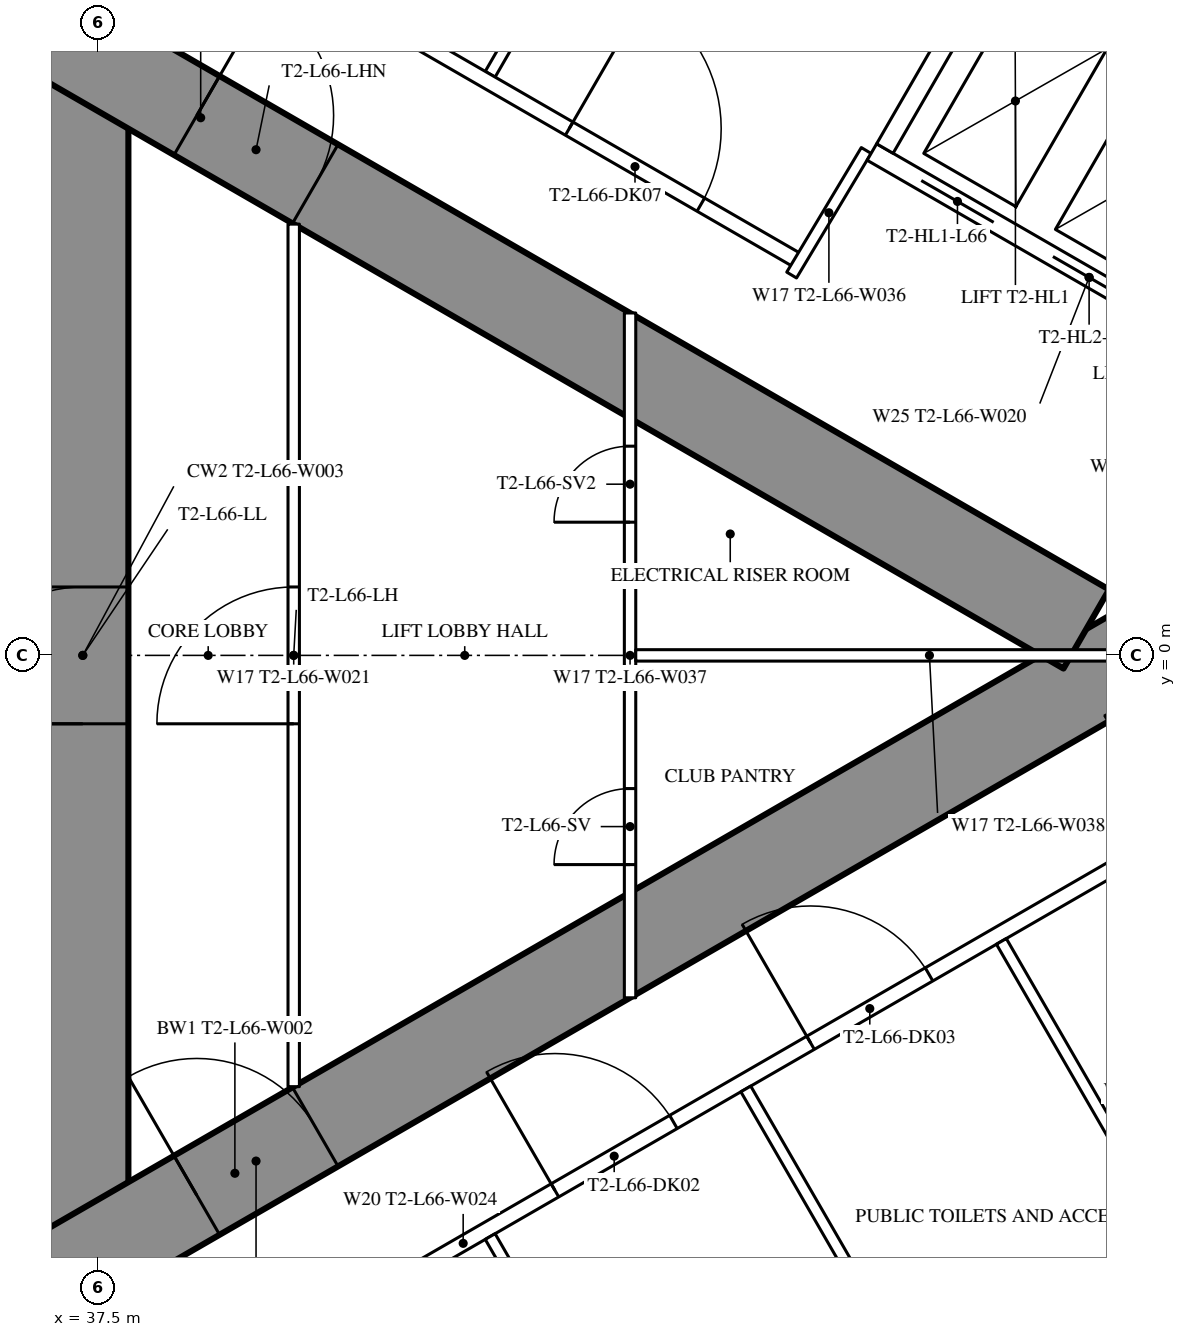
"""IFC4 building model, lengths in metres.
Left out: names, types, materials, properties, quantities, classifications, styles, units other than length and angle.
Written with IfcOpenShell. Run it as: python <this file> out.ifc"""

import sys

from ifc_helpers import new_model, si_unit, direction, frame, frame_2d, origin, place, context, subcontext, project, spatial, rectangle, extrude, element, fill, save


model = new_model("IFC4")
c1 = context("Model", 3, precision=1e-05, world=origin(), true_north=direction((0.0, 1.0)))
c2 = subcontext(c1, "Body", "Model", "MODEL_VIEW")
j1 = project(units=[si_unit("LENGTHUNIT", "METRE"), si_unit("PLANEANGLEUNIT", "RADIAN")], contexts=[c1])
p1 = place(None, origin())
s1 = spatial("IfcSite", under=j1, at=p1, CompositionType="ELEMENT")
p2 = place(p1, origin())
s2 = spatial("IfcBuilding", under=s1, at=p2, CompositionType="ELEMENT")
p3 = place(p2, frame((0.0, 0.0, 247.7)))
s3 = spatial("IfcBuildingStorey", under=s2, at=p3, CompositionType="ELEMENT", Elevation=247.7)
p4 = place(p3, frame((37.3, -8.6, 0.0), z_axis=(0.0, 0.0, 1.0), x_axis=(0.0, 1.0, 0.0)))
e1 = element("IfcWall", 1, at=p4, inside=s3, PredefinedType="SHEAR", context=c2, shape_type="SweptSolid", body=[
    extrude(rectangle(XDim=17.2, YDim=1.2, at=frame_2d((8.6, 0.0))), origin(), (0.0, 0.0, 1.0), 4.2),
])
p5 = place(p4, frame((7.7, 0.0, 0.0)))
e2 = element("IfcOpeningElement", 2, at=p5, cuts=e1, PredefinedType="OPENING", context=c2, shape_type="SweptSolid", body=[
    extrude(rectangle(XDim=1.8, YDim=2.2, at=frame_2d((0.9, 1.1))), frame((0.0, 0.61, 0.0), z_axis=(0.0, -1.0, 0.0), x_axis=(1.0, 0.0, 0.0)), (0.0, 0.0, 1.0), 1.22),
])
p6 = place(p3, frame((27.2, -13.8, 0.0), z_axis=(0.0, 0.0, 1.0), x_axis=(0.866027159892, 0.499996958321, 0.0)))
e3 = element("IfcWall", 3, at=p6, inside=s3, PredefinedType="SHEAR", context=c2, shape_type="SweptSolid", body=[
    extrude(rectangle(XDim=27.947, YDim=1.2, at=frame_2d((13.973, 0.0))), origin(), (0.0, 0.0, 1.0), 4.2),
])
p7 = place(p6, frame((4.6, 0.0, 0.0)))
e4 = element("IfcOpeningElement", 4, at=p7, cuts=e3, PredefinedType="OPENING", context=c2, shape_type="SweptSolid", body=[
    extrude(rectangle(XDim=1.0, YDim=2.2, at=frame_2d((0.5, 1.1))), frame((0.0, 0.61, 0.0), z_axis=(0.0, -1.0, 0.0), x_axis=(1.0, 0.0, 0.0)), (0.0, 0.0, 1.0), 1.22),
])
p8 = place(p6, frame((13.395, 0.0, 0.0)))
e5 = element("IfcOpeningElement", 5, at=p8, cuts=e3, PredefinedType="OPENING", context=c2, shape_type="SweptSolid", body=[
    extrude(rectangle(XDim=1.8, YDim=2.2, at=frame_2d((0.9, 1.1))), frame((0.0, 0.61, 0.0), z_axis=(0.0, -1.0, 0.0), x_axis=(1.0, 0.0, 0.0)), (0.0, 0.0, 1.0), 1.22),
])
p9 = place(p3, frame((27.2, 13.8, 0.0), z_axis=(0.0, 0.0, 1.0), x_axis=(0.866024515034, -0.500001539357, 0.0)))
e6 = element("IfcWall", 6, at=p9, inside=s3, PredefinedType="SHEAR", context=c2, shape_type="SweptSolid", body=[
    extrude(rectangle(XDim=26.907, YDim=1.2, at=frame_2d((13.454, 0.0))), origin(), (0.0, 0.0, 1.0), 4.2),
])
p10 = place(p9, frame((4.6, 0.0, 0.0)))
e7 = element("IfcOpeningElement", 7, at=p10, cuts=e6, PredefinedType="OPENING", context=c2, shape_type="SweptSolid", body=[
    extrude(rectangle(XDim=1.0, YDim=2.2, at=frame_2d((0.5, 1.1))), frame((0.0, 0.61, 0.0), z_axis=(0.0, -1.0, 0.0), x_axis=(1.0, 0.0, 0.0)), (0.0, 0.0, 1.0), 1.22),
])
p11 = place(p9, frame((13.395, 0.0, 0.0)))
e8 = element("IfcOpeningElement", 8, at=p11, cuts=e6, PredefinedType="OPENING", context=c2, shape_type="SweptSolid", body=[
    extrude(rectangle(XDim=1.8, YDim=2.2, at=frame_2d((0.9, 1.1))), frame((0.0, 0.61, 0.0), z_axis=(0.0, -1.0, 0.0), x_axis=(1.0, 0.0, 0.0)), (0.0, 0.0, 1.0), 1.22),
])
p12 = place(p3, frame((28.907, -15.47, 0.0), z_axis=(0.0, 0.0, 1.0), x_axis=(0.866023700353, 0.500002950419, 0.0)))
e9 = element("IfcWall", 9, at=p12, inside=s3, PredefinedType="PARTITIONING", context=c2, shape_type="SweptSolid", body=[
    extrude(rectangle(XDim=30.941, YDim=0.2, at=frame_2d((15.47, 0.0))), origin(), (0.0, 0.0, 1.0), 3.95),
])
p13 = place(p12, frame((7.124, 0.0, 0.0)))
e10 = element("IfcOpeningElement", 10, at=p13, cuts=e9, PredefinedType="OPENING", context=c2, shape_type="SweptSolid", body=[
    extrude(rectangle(XDim=1.8, YDim=2.2, at=frame_2d((0.9, 1.1))), frame((0.0, 0.11, 0.0), z_axis=(0.0, -1.0, 0.0), x_axis=(1.0, 0.0, 0.0)), (0.0, 0.0, 1.0), 0.22),
])
p14 = place(p12, frame((16.865, 0.0, 0.0)))
e11 = element("IfcOpeningElement", 11, at=p14, cuts=e9, PredefinedType="OPENING", context=c2, shape_type="SweptSolid", body=[
    extrude(rectangle(XDim=1.8, YDim=2.2, at=frame_2d((0.9, 1.1))), frame((0.0, 0.11, 0.0), z_axis=(0.0, -1.0, 0.0), x_axis=(1.0, 0.0, 0.0)), (0.0, 0.0, 1.0), 0.22),
])
p15 = place(p12, frame((20.748, 0.0, 0.0)))
e12 = element("IfcOpeningElement", 12, at=p15, cuts=e9, PredefinedType="OPENING", context=c2, shape_type="SweptSolid", body=[
    extrude(rectangle(XDim=1.8, YDim=2.2, at=frame_2d((0.9, 1.1))), frame((0.0, 0.11, 0.0), z_axis=(0.0, -1.0, 0.0), x_axis=(1.0, 0.0, 0.0)), (0.0, 0.0, 1.0), 0.22),
])
p16 = place(p12, frame((26.252, 0.0, 0.0)))
e13 = element("IfcOpeningElement", 13, at=p16, cuts=e9, PredefinedType="OPENING", context=c2, shape_type="SweptSolid", body=[
    extrude(rectangle(XDim=1.8, YDim=2.2, at=frame_2d((0.9, 1.1))), frame((0.0, 0.11, 0.0), z_axis=(0.0, -1.0, 0.0), x_axis=(1.0, 0.0, 0.0)), (0.0, 0.0, 1.0), 0.22),
])
p17 = place(p3, frame((42.66, -7.646, 0.0), z_axis=(0.0, 0.0, 1.0), x_axis=(0.499996592859, -0.866027370889, 0.0)))
e14 = element("IfcWall", 14, at=p17, inside=s3, PredefinedType="PARTITIONING", context=c2, shape_type="SweptSolid", body=[
    extrude(rectangle(XDim=6.398, YDim=0.15, at=frame_2d((3.199, 0.0))), origin(), (0.0, 0.0, 1.0), 3.05),
])
p18 = place(p3, frame((46.023, -5.704, 0.0), z_axis=(0.0, 0.0, 1.0), x_axis=(0.499984478165, -0.866034365135, 0.0)))
e15 = element("IfcWall", 15, at=p18, inside=s3, PredefinedType="PARTITIONING", context=c2, shape_type="SweptSolid", body=[
    extrude(rectangle(XDim=6.426, YDim=0.15, at=frame_2d((3.213, 0.0))), origin(), (0.0, 0.0, 1.0), 3.05),
])
p19 = place(p3, frame((49.385, -3.763, 0.0), z_axis=(0.0, 0.0, 1.0), x_axis=(0.499999447814, -0.866025722589, 0.0)))
e16 = element("IfcWall", 16, at=p19, inside=s3, PredefinedType="PARTITIONING", context=c2, shape_type="SweptSolid", body=[
    extrude(rectangle(XDim=6.333, YDim=0.15, at=frame_2d((3.166, 0.0))), origin(), (0.0, 0.0, 1.0), 3.05),
])
p20 = place(p3, frame((42.66, 7.646, 0.0), z_axis=(0.0, 0.0, 1.0), x_axis=(0.499996592859, 0.866027370889, 0.0)))
e17 = element("IfcWall", 17, at=p20, inside=s3, PredefinedType="PARTITIONING", context=c2, shape_type="SweptSolid", body=[
    extrude(rectangle(XDim=6.398, YDim=0.15, at=frame_2d((3.199, 0.0))), origin(), (0.0, 0.0, 1.0), 3.05),
])
p21 = place(p3, frame((28.907, 15.47, 0.0), z_axis=(0.0, 0.0, 1.0), x_axis=(0.866026627509, -0.499997880441, 0.0)))
e18 = element("IfcWall", 18, at=p21, inside=s3, PredefinedType="PARTITIONING", context=c2, shape_type="SweptSolid", body=[
    extrude(rectangle(XDim=20.563, YDim=0.2, at=frame_2d((10.282, 0.0))), origin(), (0.0, 0.0, 1.0), 3.95),
])
p22 = place(p21, frame((17.081, 0.0, 0.0)))
e19 = element("IfcOpeningElement", 19, at=p22, cuts=e18, PredefinedType="OPENING", context=c2, shape_type="SweptSolid", body=[
    extrude(rectangle(XDim=2.0, YDim=2.4, at=frame_2d((1.0, 1.2))), frame((0.0, 0.11, 0.0), z_axis=(0.0, -1.0, 0.0), x_axis=(1.0, 0.0, 0.0)), (0.0, 0.0, 1.0), 0.22),
])
p23 = place(p21, frame((7.124, 0.0, 0.0)))
e20 = element("IfcOpeningElement", 20, at=p23, cuts=e18, PredefinedType="OPENING", context=c2, shape_type="SweptSolid", body=[
    extrude(rectangle(XDim=1.8, YDim=2.2, at=frame_2d((0.9, 1.1))), frame((0.0, 0.11, 0.0), z_axis=(0.0, -1.0, 0.0), x_axis=(1.0, 0.0, 0.0)), (0.0, 0.0, 1.0), 0.22),
])
p24 = place(p3, frame((47.606, 6.642, 0.0), z_axis=(0.0, 0.0, 1.0), x_axis=(-0.51353662755, -0.858067673418, 0.0)))
e21 = element("IfcWall", 21, at=p24, inside=s3, PredefinedType="PARTITIONING", context=c2, shape_type="SweptSolid", body=[
    extrude(rectangle(XDim=1.91, YDim=0.15, at=frame_2d((0.955, 0.0))), origin(), (0.0, 0.0, 1.0), 3.95),
])
p25 = place(p3, frame((40.075, -5.674, 0.0), z_axis=(0.0, 0.0, 1.0), x_axis=(0.0, 1.0, 0.0)))
e22 = element("IfcWall", 22, at=p25, inside=s3, PredefinedType="PARTITIONING", context=c2, shape_type="SweptSolid", body=[
    extrude(rectangle(XDim=11.348, YDim=0.15, at=frame_2d((5.674, 0.0))), origin(), (0.0, 0.0, 1.0), 3.95),
])
p26 = place(p25, frame((4.774, 0.0, 0.0)))
e23 = element("IfcOpeningElement", 23, at=p26, cuts=e22, PredefinedType="OPENING", context=c2, shape_type="SweptSolid", body=[
    extrude(rectangle(XDim=1.8, YDim=2.2, at=frame_2d((0.9, 1.1))), frame((0.0, 0.085, 0.0), z_axis=(0.0, -1.0, 0.0), x_axis=(1.0, 0.0, 0.0)), (0.0, 0.0, 1.0), 0.17),
])
p27 = place(p3, frame((44.5, -4.505, 0.0), z_axis=(0.0, 0.0, 1.0), x_axis=(0.0, 1.0, 0.0)))
e24 = element("IfcWall", 24, at=p27, inside=s3, PredefinedType="PARTITIONING", context=c2, shape_type="SweptSolid", body=[
    extrude(rectangle(XDim=9.009, YDim=0.15, at=frame_2d((4.505, 0.0))), origin(), (0.0, 0.0, 1.0), 3.95),
])
p28 = place(p27, frame((1.752, 0.0, 0.0)))
e25 = element("IfcOpeningElement", 25, at=p28, cuts=e24, PredefinedType="OPENING", context=c2, shape_type="SweptSolid", body=[
    extrude(rectangle(XDim=1.0, YDim=2.2, at=frame_2d((0.5, 1.1))), frame((0.0, 0.085, 0.0), z_axis=(0.0, -1.0, 0.0), x_axis=(1.0, 0.0, 0.0)), (0.0, 0.0, 1.0), 0.17),
])
p29 = place(p27, frame((6.257, 0.0, 0.0)))
e26 = element("IfcOpeningElement", 26, at=p29, cuts=e24, PredefinedType="OPENING", context=c2, shape_type="SweptSolid", body=[
    extrude(rectangle(XDim=1.0, YDim=2.2, at=frame_2d((0.5, 1.1))), frame((0.0, 0.085, 0.0), z_axis=(0.0, -1.0, 0.0), x_axis=(1.0, 0.0, 0.0)), (0.0, 0.0, 1.0), 0.17),
])
p30 = place(p3, frame((44.575, 0.0, 0.0), z_axis=(0.0, 0.0, 1.0), x_axis=(1.0, 0.0, 0.0)))
e27 = element("IfcWall", 27, at=p30, inside=s3, PredefinedType="PARTITIONING", context=c2, shape_type="SweptSolid", body=[
    extrude(rectangle(XDim=7.727, YDim=0.15, at=frame_2d((3.864, 0.0))), origin(), (0.0, 0.0, 1.0), 3.05),
])
p31 = place(p3, frame((47.681, 6.622, 0.0), z_axis=(0.0, 0.0, 1.0), x_axis=(0.86603344179, -0.499986077507, 0.0)))
e28 = element("IfcWall", 28, at=p31, inside=s3, PredefinedType="PARTITIONING", context=c2, shape_type="SweptSolid", body=[
    extrude(rectangle(XDim=6.6, YDim=0.25, at=frame_2d((3.3, 0.0))), origin(), (0.0, 0.0, 1.0), 3.95),
])
p32 = place(p31, frame((0.75, 0.0, 0.0)))
e29 = element("IfcOpeningElement", 29, at=p32, cuts=e28, PredefinedType="OPENING", context=c2, shape_type="SweptSolid", body=[
    extrude(rectangle(XDim=1.1, YDim=2.2, at=frame_2d((0.55, 1.1))), frame((0.0, 0.135, 0.0), z_axis=(0.0, -1.0, 0.0), x_axis=(1.0, 0.0, 0.0)), (0.0, 0.0, 1.0), 0.27),
])
p33 = place(p31, frame((2.75, 0.0, 0.0)))
e30 = element("IfcOpeningElement", 30, at=p33, cuts=e28, PredefinedType="OPENING", context=c2, shape_type="SweptSolid", body=[
    extrude(rectangle(XDim=1.1, YDim=2.2, at=frame_2d((0.55, 1.1))), frame((0.0, 0.135, 0.0), z_axis=(0.0, -1.0, 0.0), x_axis=(1.0, 0.0, 0.0)), (0.0, 0.0, 1.0), 0.27),
])
p34 = place(p31, frame((4.75, 0.0, 0.0)))
e31 = element("IfcOpeningElement", 31, at=p34, cuts=e28, PredefinedType="OPENING", context=c2, shape_type="SweptSolid", body=[
    extrude(rectangle(XDim=1.1, YDim=2.2, at=frame_2d((0.55, 1.1))), frame((0.0, 0.135, 0.0), z_axis=(0.0, -1.0, 0.0), x_axis=(1.0, 0.0, 0.0)), (0.0, 0.0, 1.0), 0.27),
])
p35 = place(p3, frame((49.406, 9.611, 0.0), z_axis=(0.0, 0.0, 1.0), x_axis=(0.86603344179, -0.499986077507, 0.0)))
e32 = element("IfcWall", 32, at=p35, inside=s3, PredefinedType="PARTITIONING", context=c2, shape_type="SweptSolid", body=[
    extrude(rectangle(XDim=6.6, YDim=0.25, at=frame_2d((3.3, 0.0))), origin(), (0.0, 0.0, 1.0), 3.95),
])
p36 = place(p3, frame((47.852, 6.668, 0.0), z_axis=(0.0, 0.0, 1.0), x_axis=(0.499929347863, 0.866066190972, 0.0)))
e33 = element("IfcWall", 33, at=p36, inside=s3, PredefinedType="PARTITIONING", context=c2, shape_type="SweptSolid", body=[
    extrude(rectangle(XDim=3.201, YDim=0.25, at=frame_2d((1.6, 0.0))), origin(), (0.0, 0.0, 1.0), 3.95),
])
p37 = place(p14, origin())
e34 = element("IfcDoor", 34, at=p37, inside=s3, OperationType="DOUBLE_DOOR_SINGLE_SWING", PredefinedType="DOOR", context=c2, shape_type="SweptSolid", body=[
    extrude(rectangle(XDim=1.8, YDim=2.2, at=frame_2d((0.9, 1.1))), frame((0.0, 0.025, 0.0), z_axis=(0.0, -1.0, 0.0), x_axis=(1.0, 0.0, 0.0)), (0.0, 0.0, 1.0), 0.05),
])
fill(e11, e34)
p38 = place(p15, origin())
e35 = element("IfcDoor", 35, at=p38, inside=s3, OperationType="DOUBLE_DOOR_SINGLE_SWING", PredefinedType="DOOR", context=c2, shape_type="SweptSolid", body=[
    extrude(rectangle(XDim=1.8, YDim=2.2, at=frame_2d((0.9, 1.1))), frame((0.0, 0.025, 0.0), z_axis=(0.0, -1.0, 0.0), x_axis=(1.0, 0.0, 0.0)), (0.0, 0.0, 1.0), 0.05),
])
fill(e12, e35)
p39 = place(p22, origin())
e36 = element("IfcDoor", 36, at=p39, inside=s3, OperationType="DOUBLE_DOOR_SINGLE_SWING", PredefinedType="DOOR", context=c2, shape_type="SweptSolid", body=[
    extrude(rectangle(XDim=2.0, YDim=2.4, at=frame_2d((1.0, 1.2))), frame((0.0, 0.025, 0.0), z_axis=(0.0, -1.0, 0.0), x_axis=(1.0, 0.0, 0.0)), (0.0, 0.0, 1.0), 0.05),
])
fill(e19, e36)
p40 = place(p26, origin())
e37 = element("IfcDoor", 37, at=p40, inside=s3, OperationType="DOUBLE_DOOR_SINGLE_SWING", PredefinedType="DOOR", context=c2, shape_type="SweptSolid", body=[
    extrude(rectangle(XDim=1.8, YDim=2.2, at=frame_2d((0.9, 1.1))), frame((0.0, 0.025, 0.0), z_axis=(0.0, -1.0, 0.0), x_axis=(1.0, 0.0, 0.0)), (0.0, 0.0, 1.0), 0.05),
])
fill(e23, e37)
p41 = place(p28, origin())
e38 = element("IfcDoor", 38, at=p41, inside=s3, OperationType="SINGLE_SWING_LEFT", PredefinedType="DOOR", context=c2, shape_type="SweptSolid", body=[
    extrude(rectangle(XDim=1.0, YDim=2.2, at=frame_2d((0.5, 1.1))), frame((0.0, 0.025, 0.0), z_axis=(0.0, -1.0, 0.0), x_axis=(1.0, 0.0, 0.0)), (0.0, 0.0, 1.0), 0.05),
])
fill(e25, e38)
p42 = place(p29, origin())
e39 = element("IfcDoor", 39, at=p42, inside=s3, OperationType="SINGLE_SWING_LEFT", PredefinedType="DOOR", context=c2, shape_type="SweptSolid", body=[
    extrude(rectangle(XDim=1.0, YDim=2.2, at=frame_2d((0.5, 1.1))), frame((0.0, 0.025, 0.0), z_axis=(0.0, -1.0, 0.0), x_axis=(1.0, 0.0, 0.0)), (0.0, 0.0, 1.0), 0.05),
])
fill(e26, e39)
p43 = place(p8, origin())
e40 = element("IfcDoor", 40, at=p43, inside=s3, OperationType="DOUBLE_DOOR_SINGLE_SWING", PredefinedType="DOOR", context=c2, shape_type="SweptSolid", body=[
    extrude(rectangle(XDim=1.8, YDim=2.2, at=frame_2d((0.9, 1.1))), frame((0.0, 0.025, 0.0), z_axis=(0.0, -1.0, 0.0), x_axis=(1.0, 0.0, 0.0)), (0.0, 0.0, 1.0), 0.05),
])
fill(e5, e40)
p44 = place(p11, origin())
e41 = element("IfcDoor", 41, at=p44, inside=s3, OperationType="DOUBLE_DOOR_SINGLE_SWING", PredefinedType="DOOR", context=c2, shape_type="SweptSolid", body=[
    extrude(rectangle(XDim=1.8, YDim=2.2, at=frame_2d((0.9, 1.1))), frame((0.0, 0.025, 0.0), z_axis=(0.0, -1.0, 0.0), x_axis=(1.0, 0.0, 0.0)), (0.0, 0.0, 1.0), 0.05),
])
fill(e8, e41)
p45 = place(p5, origin())
e42 = element("IfcDoor", 42, at=p45, inside=s3, OperationType="DOUBLE_DOOR_SINGLE_SWING", PredefinedType="DOOR", context=c2, shape_type="SweptSolid", body=[
    extrude(rectangle(XDim=1.8, YDim=2.2, at=frame_2d((0.9, 1.1))), frame((0.0, 0.025, 0.0), z_axis=(0.0, -1.0, 0.0), x_axis=(1.0, 0.0, 0.0)), (0.0, 0.0, 1.0), 0.05),
])
fill(e2, e42)
p46 = place(p32, origin())
e43 = element("IfcDoor", 43, at=p46, inside=s3, OperationType="DOUBLE_DOOR_SLIDING", PredefinedType="USERDEFINED", context=c2, shape_type="SweptSolid", body=[
    extrude(rectangle(XDim=1.1, YDim=2.2, at=frame_2d((0.55, 1.1))), frame((0.0, 0.025, 0.0), z_axis=(0.0, -1.0, 0.0), x_axis=(1.0, 0.0, 0.0)), (0.0, 0.0, 1.0), 0.05),
])
fill(e29, e43)
p47 = place(p33, origin())
e44 = element("IfcDoor", 44, at=p47, inside=s3, OperationType="DOUBLE_DOOR_SLIDING", PredefinedType="USERDEFINED", context=c2, shape_type="SweptSolid", body=[
    extrude(rectangle(XDim=1.1, YDim=2.2, at=frame_2d((0.55, 1.1))), frame((0.0, 0.025, 0.0), z_axis=(0.0, -1.0, 0.0), x_axis=(1.0, 0.0, 0.0)), (0.0, 0.0, 1.0), 0.05),
])
fill(e30, e44)
save(model, sys.argv[1])
